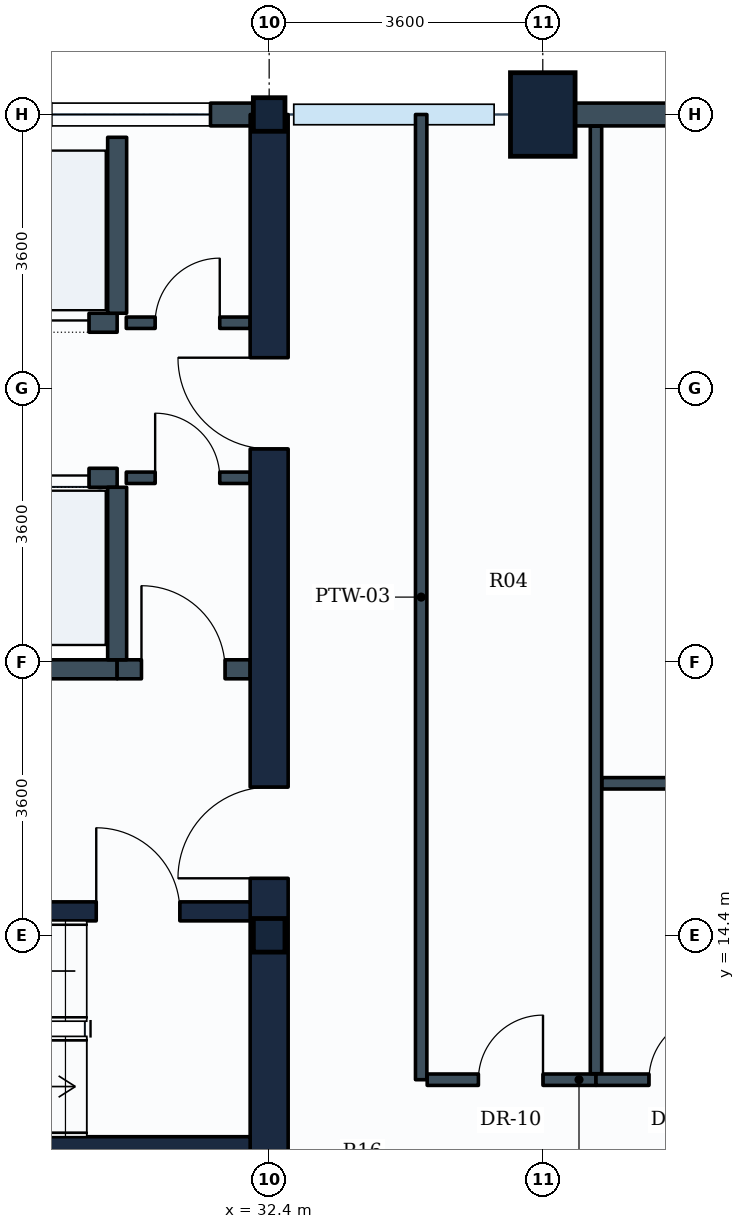
"""IFC4 building model, lengths in metres.
Left out: names, types, materials, properties, quantities, classifications, styles, units other than length and angle.
Written with IfcOpenShell. Run it as: python <this file> out.ifc"""

import sys

from ifc_helpers import new_model, si_unit, direction, frame, frame_2d, origin, origin_2d, place, context, subcontext, project, spatial, rectangle, i_section, extrude, element, fill, save


model = new_model("IFC4")
c1 = context("Model", 3, precision=1e-05, world=origin(), true_north=direction((0.0, 1.0)))
c2 = subcontext(c1, "Body", "Model", "MODEL_VIEW")
j1 = project(units=[si_unit("LENGTHUNIT", "METRE"), si_unit("PLANEANGLEUNIT", "RADIAN")], contexts=[c1])
p1 = place(None, origin())
s1 = spatial("IfcSite", under=j1, at=p1, CompositionType="ELEMENT")
p2 = place(p1, origin())
s2 = spatial("IfcBuilding", under=s1, at=p2, CompositionType="ELEMENT")
p3 = place(p2, frame((0.0, 0.0, 115.2)))
s3 = spatial("IfcBuildingStorey", under=s2, at=p3, CompositionType="ELEMENT", Elevation=115.2)
for number, where, z_axis, x_axis in (
    (1, (32.4, 14.4, 0.0), (0.0, 0.0, 1.0), (1.0, 0.0, 0.0)),
    (2, (32.4, 25.2, 0.0), (0.0, 0.0, 1.0), (1.0, 0.0, 0.0)),
):
    element("IfcColumn", number, at=place(p3, frame(where, z_axis=z_axis, x_axis=x_axis)), inside=s3, PredefinedType="COLUMN", context=c2, shape_type="SweptSolid", body=[
        extrude(i_section(OverallWidth=0.416, OverallDepth=0.442, WebThickness=0.025, FlangeThickness=0.041, FilletRadius=0.015, at=origin_2d()), origin(), (0.0, 0.0, 1.0), 4.8),
    ])
p4 = place(p3, frame((36.0, 25.2, 0.0), z_axis=(0.0, 0.0, 1.0), x_axis=(1.0, 0.0, 0.0)))
e3 = element("IfcColumn", 3, at=p4, inside=s3, PredefinedType="COLUMN", context=c2, shape_type="SweptSolid", body=[
    extrude(rectangle(XDim=0.85, YDim=1.1, at=origin_2d()), origin(), (0.0, 0.0, 1.0), 4.8),
])
p5 = place(p3, frame((36.0, 25.2, 0.0), z_axis=(0.0, 0.0, 1.0), x_axis=(1.0, 0.0, 0.0)))
e4 = element("IfcWall", 4, at=p5, inside=s3, PredefinedType="STANDARD", context=c2, shape_type="SweptSolid", body=[
    extrude(rectangle(XDim=3.6, YDim=0.3, at=frame_2d((1.8, 0.0))), origin(), (0.0, 0.0, 1.0), 3.93),
])
p6 = place(p3, frame((28.8, 25.2, 0.0), z_axis=(0.0, 0.0, 1.0), x_axis=(1.0, 0.0, 0.0)))
e5 = element("IfcWall", 5, at=p6, inside=s3, PredefinedType="STANDARD", context=c2, shape_type="SweptSolid", body=[
    extrude(rectangle(XDim=3.6, YDim=0.3, at=frame_2d((1.8, 0.0))), origin(), (0.0, 0.0, 1.0), 4.535),
])
p7 = place(p6, frame((0.728, 0.0, 0.85)))
e6 = element("IfcOpeningElement", 6, at=p7, cuts=e5, PredefinedType="OPENING", context=c2, shape_type="SweptSolid", body=[
    extrude(rectangle(XDim=2.1, YDim=1.35, at=frame_2d((1.05, 0.675))), frame((0.0, 0.16, 0.0), z_axis=(0.0, -1.0, 0.0), x_axis=(1.0, 0.0, 0.0)), (0.0, 0.0, 1.0), 0.32),
])
p8 = place(p3, frame((32.4, 10.8, 0.0), z_axis=(0.0, 0.0, 1.0), x_axis=(0.0, 1.0, 0.0)))
e7 = element("IfcWall", 7, at=p8, inside=s3, PredefinedType="SHEAR", context=c2, shape_type="SweptSolid", body=[
    extrude(rectangle(XDim=14.4, YDim=0.5, at=frame_2d((7.2, 0.0))), origin(), (0.0, 0.0, 1.0), 4.55),
])
p9 = place(p8, frame((4.35, 0.0, 0.0)))
e8 = element("IfcOpeningElement", 8, at=p9, cuts=e7, PredefinedType="OPENING", context=c2, shape_type="SweptSolid", body=[
    extrude(rectangle(XDim=1.2, YDim=2.1, at=frame_2d((0.6, 1.05))), frame((0.0, 0.26, 0.0), z_axis=(0.0, -1.0, 0.0), x_axis=(1.0, 0.0, 0.0)), (0.0, 0.0, 1.0), 0.52),
])
p10 = place(p8, frame((10.0, 0.0, 0.0)))
e9 = element("IfcOpeningElement", 9, at=p10, cuts=e7, PredefinedType="OPENING", context=c2, shape_type="SweptSolid", body=[
    extrude(rectangle(XDim=1.2, YDim=2.1, at=frame_2d((0.6, 1.05))), frame((0.0, 0.26, 0.0), z_axis=(0.0, -1.0, 0.0), x_axis=(1.0, 0.0, 0.0)), (0.0, 0.0, 1.0), 0.52),
])
p11 = place(p3, frame((23.35, 11.625, 0.0), z_axis=(0.0, 0.0, 1.0), x_axis=(1.0, 0.0, 0.0)))
e10 = element("IfcWall", 10, at=p11, inside=s3, PredefinedType="SHEAR", context=c2, shape_type="SweptSolid", body=[
    extrude(rectangle(XDim=8.8, YDim=0.25, at=frame_2d((4.4, 0.0))), origin(), (0.0, 0.0, 1.0), 4.55),
])
p12 = place(p3, frame((23.35, 14.715, 0.0), z_axis=(0.0, 0.0, 1.0), x_axis=(1.0, 0.0, 0.0)))
e11 = element("IfcWall", 11, at=p12, inside=s3, PredefinedType="SHEAR", context=c2, shape_type="SweptSolid", body=[
    extrude(rectangle(XDim=8.8, YDim=0.25, at=frame_2d((4.4, 0.0))), origin(), (0.0, 0.0, 1.0), 4.55),
])
p13 = place(p12, frame((6.775, 0.0, 0.0)))
e12 = element("IfcOpeningElement", 12, at=p13, cuts=e11, PredefinedType="OPENING", context=c2, shape_type="SweptSolid", body=[
    extrude(rectangle(XDim=1.1, YDim=2.1, at=frame_2d((0.55, 1.05))), frame((0.0, 0.135, 0.0), z_axis=(0.0, -1.0, 0.0), x_axis=(1.0, 0.0, 0.0)), (0.0, 0.0, 1.0), 0.27),
])
p14 = place(p3, frame((21.88, 17.9, 0.0), z_axis=(0.0, 0.0, 1.0), x_axis=(1.0, 0.0, 0.0)))
e13 = element("IfcWall", 13, at=p14, inside=s3, PredefinedType="PARTITIONING", context=c2, shape_type="SweptSolid", body=[
    extrude(rectangle(XDim=8.52, YDim=0.25, at=frame_2d((4.26, 0.0))), origin(), (0.0, 0.0, 1.0), 4.535),
])
p15 = place(p3, frame((30.4, 17.9, 0.0), z_axis=(0.0, 0.0, 1.0), x_axis=(1.0, 0.0, 0.0)))
e14 = element("IfcWall", 14, at=p15, inside=s3, PredefinedType="PARTITIONING", context=c2, shape_type="SweptSolid", body=[
    extrude(rectangle(XDim=1.75, YDim=0.25, at=frame_2d((0.875, 0.0))), origin(), (0.0, 0.0, 1.0), 4.535),
])
p16 = place(p15, frame((0.32, 0.0, 0.0)))
e15 = element("IfcOpeningElement", 15, at=p16, cuts=e14, PredefinedType="OPENING", context=c2, shape_type="SweptSolid", body=[
    extrude(rectangle(XDim=1.1, YDim=2.1, at=frame_2d((0.55, 1.05))), frame((0.0, 0.135, 0.0), z_axis=(0.0, -1.0, 0.0), x_axis=(1.0, 0.0, 0.0)), (0.0, 0.0, 1.0), 0.27),
])
p17 = place(p3, frame((23.18, 20.42, 0.0), z_axis=(0.0, 0.0, 1.0), x_axis=(1.0, 0.0, 0.0)))
e16 = element("IfcWall", 16, at=p17, inside=s3, PredefinedType="PARTITIONING", context=c2, shape_type="SweptSolid", body=[
    extrude(rectangle(XDim=7.22, YDim=0.25, at=frame_2d((3.61, 0.0))), origin(), (0.0, 0.0, 1.0), 4.535),
])
p18 = place(p17, frame((0.41, 0.0, 0.0)))
e17 = element("IfcOpeningElement", 17, at=p18, cuts=e16, PredefinedType="OPENING", context=c2, shape_type="SweptSolid", body=[
    extrude(rectangle(XDim=1.1, YDim=2.1, at=frame_2d((0.55, 1.05))), frame((0.0, 0.135, 0.0), z_axis=(0.0, -1.0, 0.0), x_axis=(1.0, 0.0, 0.0)), (0.0, 0.0, 1.0), 0.27),
])
p19 = place(p17, frame((2.19, 0.0, 0.0)))
e18 = element("IfcOpeningElement", 18, at=p19, cuts=e16, PredefinedType="OPENING", context=c2, shape_type="SweptSolid", body=[
    extrude(rectangle(XDim=1.1, YDim=2.1, at=frame_2d((0.55, 1.05))), frame((0.0, 0.135, 0.0), z_axis=(0.0, -1.0, 0.0), x_axis=(1.0, 0.0, 0.0)), (0.0, 0.0, 1.0), 0.27),
])
p20 = place(p17, frame((3.97, 0.0, 0.0)))
e19 = element("IfcOpeningElement", 19, at=p20, cuts=e16, PredefinedType="OPENING", context=c2, shape_type="SweptSolid", body=[
    extrude(rectangle(XDim=1.1, YDim=2.1, at=frame_2d((0.55, 1.05))), frame((0.0, 0.135, 0.0), z_axis=(0.0, -1.0, 0.0), x_axis=(1.0, 0.0, 0.0)), (0.0, 0.0, 1.0), 0.27),
])
p21 = place(p17, frame((5.75, 0.0, 0.0)))
e20 = element("IfcOpeningElement", 20, at=p21, cuts=e16, PredefinedType="OPENING", context=c2, shape_type="SweptSolid", body=[
    extrude(rectangle(XDim=1.1, YDim=2.1, at=frame_2d((0.55, 1.05))), frame((0.0, 0.135, 0.0), z_axis=(0.0, -1.0, 0.0), x_axis=(1.0, 0.0, 0.0)), (0.0, 0.0, 1.0), 0.27),
])
p22 = place(p3, frame((30.4, 18.025, 0.0), z_axis=(0.0, 0.0, 1.0), x_axis=(0.0, 1.0, 0.0)))
e21 = element("IfcWall", 21, at=p22, inside=s3, PredefinedType="PARTITIONING", context=c2, shape_type="SweptSolid", body=[
    extrude(rectangle(XDim=2.27, YDim=0.25, at=frame_2d((1.135, 0.0))), origin(), (0.0, 0.0, 1.0), 4.535),
])
p23 = place(p3, frame((23.18, 22.46, 0.0), z_axis=(0.0, 0.0, 1.0), x_axis=(1.0, 0.0, 0.0)))
e22 = element("IfcWall", 22, at=p23, inside=s3, PredefinedType="PARTITIONING", context=c2, shape_type="SweptSolid", body=[
    extrude(rectangle(XDim=7.22, YDim=0.25, at=frame_2d((3.61, 0.0))), origin(), (0.0, 0.0, 1.0), 4.535),
])
p24 = place(p23, frame((0.41, 0.0, 0.0)))
e23 = element("IfcOpeningElement", 23, at=p24, cuts=e22, PredefinedType="OPENING", context=c2, shape_type="SweptSolid", body=[
    extrude(rectangle(XDim=1.1, YDim=2.1, at=frame_2d((0.55, 1.05))), frame((0.0, 0.135, 0.0), z_axis=(0.0, -1.0, 0.0), x_axis=(1.0, 0.0, 0.0)), (0.0, 0.0, 1.0), 0.27),
])
p25 = place(p23, frame((2.19, 0.0, 0.0)))
e24 = element("IfcOpeningElement", 24, at=p25, cuts=e22, PredefinedType="OPENING", context=c2, shape_type="SweptSolid", body=[
    extrude(rectangle(XDim=1.1, YDim=2.1, at=frame_2d((0.55, 1.05))), frame((0.0, 0.135, 0.0), z_axis=(0.0, -1.0, 0.0), x_axis=(1.0, 0.0, 0.0)), (0.0, 0.0, 1.0), 0.27),
])
p26 = place(p23, frame((3.97, 0.0, 0.0)))
e25 = element("IfcOpeningElement", 25, at=p26, cuts=e22, PredefinedType="OPENING", context=c2, shape_type="SweptSolid", body=[
    extrude(rectangle(XDim=1.1, YDim=2.1, at=frame_2d((0.55, 1.05))), frame((0.0, 0.135, 0.0), z_axis=(0.0, -1.0, 0.0), x_axis=(1.0, 0.0, 0.0)), (0.0, 0.0, 1.0), 0.27),
])
p27 = place(p23, frame((5.75, 0.0, 0.0)))
e26 = element("IfcOpeningElement", 26, at=p27, cuts=e22, PredefinedType="OPENING", context=c2, shape_type="SweptSolid", body=[
    extrude(rectangle(XDim=1.1, YDim=2.1, at=frame_2d((0.55, 1.05))), frame((0.0, 0.135, 0.0), z_axis=(0.0, -1.0, 0.0), x_axis=(1.0, 0.0, 0.0)), (0.0, 0.0, 1.0), 0.27),
])
p28 = place(p3, frame((30.4, 22.585, 0.0), z_axis=(0.0, 0.0, 1.0), x_axis=(0.0, 1.0, 0.0)))
e27 = element("IfcWall", 27, at=p28, inside=s3, PredefinedType="PARTITIONING", context=c2, shape_type="SweptSolid", body=[
    extrude(rectangle(XDim=2.315, YDim=0.25, at=frame_2d((1.157, 0.0))), origin(), (0.0, 0.0, 1.0), 4.535),
])
p29 = place(p3, frame((30.52, 22.46, 0.0), z_axis=(0.0, 0.0, 1.0), x_axis=(1.0, 0.0, 0.0)))
e28 = element("IfcWall", 28, at=p29, inside=s3, PredefinedType="PARTITIONING", context=c2, shape_type="SweptSolid", body=[
    extrude(rectangle(XDim=1.63, YDim=0.15, at=frame_2d((0.815, 0.0))), origin(), (0.0, 0.0, 1.0), 4.535),
])
p30 = place(p29, frame((0.38, 0.0, 0.0)))
e29 = element("IfcOpeningElement", 29, at=p30, cuts=e28, PredefinedType="OPENING", context=c2, shape_type="SweptSolid", body=[
    extrude(rectangle(XDim=0.85, YDim=2.1, at=frame_2d((0.425, 1.05))), frame((0.0, 0.085, 0.0), z_axis=(0.0, -1.0, 0.0), x_axis=(1.0, 0.0, 0.0)), (0.0, 0.0, 1.0), 0.17),
])
p31 = place(p3, frame((30.52, 20.42, 0.0), z_axis=(0.0, 0.0, 1.0), x_axis=(1.0, 0.0, 0.0)))
e30 = element("IfcWall", 30, at=p31, inside=s3, PredefinedType="PARTITIONING", context=c2, shape_type="SweptSolid", body=[
    extrude(rectangle(XDim=1.63, YDim=0.15, at=frame_2d((0.815, 0.0))), origin(), (0.0, 0.0, 1.0), 4.535),
])
p32 = place(p31, frame((0.38, 0.0, 0.0)))
e31 = element("IfcOpeningElement", 31, at=p32, cuts=e30, PredefinedType="OPENING", context=c2, shape_type="SweptSolid", body=[
    extrude(rectangle(XDim=0.85, YDim=2.1, at=frame_2d((0.425, 1.05))), frame((0.0, 0.085, 0.0), z_axis=(0.0, -1.0, 0.0), x_axis=(1.0, 0.0, 0.0)), (0.0, 0.0, 1.0), 0.17),
])
p33 = place(p3, frame((34.4, 12.5, 0.0), z_axis=(0.0, 0.0, 1.0), x_axis=(0.0, 1.0, 0.0)))
e32 = element("IfcWall", 32, at=p33, inside=s3, PredefinedType="PARTITIONING", context=c2, shape_type="SweptSolid", body=[
    extrude(rectangle(XDim=12.7, YDim=0.15, at=frame_2d((6.35, 0.0))), origin(), (0.0, 0.0, 1.0), 3.93),
])
p34 = place(p3, frame((34.479, 12.5, 0.0), z_axis=(0.0, 0.0, 1.0), x_axis=(1.0, 0.0, 0.0)))
e33 = element("IfcWall", 33, at=p34, inside=s3, PredefinedType="PARTITIONING", context=c2, shape_type="SweptSolid", body=[
    extrude(rectangle(XDim=2.221, YDim=0.15, at=frame_2d((1.11, 0.0))), origin(), (0.0, 0.0, 1.0), 4.08),
])
p35 = place(p34, frame((0.674, 0.0, 0.0)))
e34 = element("IfcOpeningElement", 34, at=p35, cuts=e33, PredefinedType="OPENING", context=c2, shape_type="SweptSolid", body=[
    extrude(rectangle(XDim=0.85, YDim=2.1, at=frame_2d((0.425, 1.05))), frame((0.0, 0.085, 0.0), z_axis=(0.0, -1.0, 0.0), x_axis=(1.0, 0.0, 0.0)), (0.0, 0.0, 1.0), 0.17),
])
p36 = place(p3, frame((36.7, 12.579, 0.0), z_axis=(0.0, 0.0, 1.0), x_axis=(0.0, 1.0, 0.0)))
e35 = element("IfcWall", 35, at=p36, inside=s3, PredefinedType="PARTITIONING", context=c2, shape_type="SweptSolid", body=[
    extrude(rectangle(XDim=12.467, YDim=0.15, at=frame_2d((6.233, 0.0))), origin(), (0.0, 0.0, 1.0), 3.93),
])
p37 = place(p3, frame((36.7, 12.5, 0.0), z_axis=(0.0, 0.0, 1.0), x_axis=(1.0, 0.0, 0.0)))
e36 = element("IfcWall", 36, at=p37, inside=s3, PredefinedType="PARTITIONING", context=c2, shape_type="SweptSolid", body=[
    extrude(rectangle(XDim=2.3, YDim=0.15, at=frame_2d((1.15, 0.0))), origin(), (0.0, 0.0, 1.0), 4.535),
])
p38 = place(p37, frame((0.697, 0.0, 0.0)))
e37 = element("IfcOpeningElement", 37, at=p38, cuts=e36, PredefinedType="OPENING", context=c2, shape_type="SweptSolid", body=[
    extrude(rectangle(XDim=0.85, YDim=2.1, at=frame_2d((0.425, 1.05))), frame((0.0, 0.085, 0.0), z_axis=(0.0, -1.0, 0.0), x_axis=(1.0, 0.0, 0.0)), (0.0, 0.0, 1.0), 0.17),
])
p39 = place(p3, frame((36.779, 16.4, 0.0), z_axis=(0.0, 0.0, 1.0), x_axis=(1.0, 0.0, 0.0)))
e38 = element("IfcWall", 38, at=p39, inside=s3, PredefinedType="PARTITIONING", context=c2, shape_type="SweptSolid", body=[
    extrude(rectangle(XDim=2.142, YDim=0.15, at=frame_2d((1.071, 0.0))), origin(), (0.0, 0.0, 1.0), 4.535),
])
p40 = place(p7, origin())
e39 = element("IfcWindow", 39, at=p40, inside=s3, PartitioningType="SINGLE_PANEL", PredefinedType="WINDOW", context=c2, shape_type="SweptSolid", body=[
    extrude(rectangle(XDim=2.1, YDim=1.35, at=frame_2d((1.05, 0.675))), frame((0.0, 0.03, 0.0), z_axis=(0.0, -1.0, 0.0), x_axis=(1.0, 0.0, 0.0)), (0.0, 0.0, 1.0), 0.06),
])
fill(e6, e39)
p41 = place(p13, origin())
e40 = element("IfcDoor", 40, at=p41, inside=s3, OperationType="SINGLE_SWING_LEFT", PredefinedType="DOOR", context=c2, shape_type="SweptSolid", body=[
    extrude(rectangle(XDim=1.1, YDim=2.1, at=frame_2d((0.55, 1.05))), frame((0.0, 0.025, 0.0), z_axis=(0.0, -1.0, 0.0), x_axis=(1.0, 0.0, 0.0)), (0.0, 0.0, 1.0), 0.05),
])
fill(e12, e40)
p42 = place(p9, origin())
e41 = element("IfcDoor", 41, at=p42, inside=s3, OperationType="SINGLE_SWING_LEFT", PredefinedType="DOOR", context=c2, shape_type="SweptSolid", body=[
    extrude(rectangle(XDim=1.2, YDim=2.1, at=frame_2d((0.6, 1.05))), frame((0.0, 0.025, 0.0), z_axis=(0.0, -1.0, 0.0), x_axis=(1.0, 0.0, 0.0)), (0.0, 0.0, 1.0), 0.05),
])
fill(e8, e41)
p43 = place(p16, origin())
e42 = element("IfcDoor", 42, at=p43, inside=s3, OperationType="SINGLE_SWING_LEFT", PredefinedType="DOOR", context=c2, shape_type="SweptSolid", body=[
    extrude(rectangle(XDim=1.1, YDim=2.1, at=frame_2d((0.55, 1.05))), frame((0.0, 0.025, 0.0), z_axis=(0.0, -1.0, 0.0), x_axis=(1.0, 0.0, 0.0)), (0.0, 0.0, 1.0), 0.05),
])
fill(e15, e42)
p44 = place(p21, origin())
e43 = element("IfcDoor", 43, at=p44, inside=s3, OperationType="SLIDING_TO_LEFT", PredefinedType="DOOR", context=c2, shape_type="SweptSolid", body=[
    extrude(rectangle(XDim=1.1, YDim=2.1, at=frame_2d((0.55, 1.05))), frame((0.0, 0.025, 0.0), z_axis=(0.0, -1.0, 0.0), x_axis=(1.0, 0.0, 0.0)), (0.0, 0.0, 1.0), 0.05),
])
fill(e20, e43)
p45 = place(p27, origin())
e44 = element("IfcDoor", 44, at=p45, inside=s3, OperationType="SLIDING_TO_LEFT", PredefinedType="DOOR", context=c2, shape_type="SweptSolid", body=[
    extrude(rectangle(XDim=1.1, YDim=2.1, at=frame_2d((0.55, 1.05))), frame((0.0, 0.025, 0.0), z_axis=(0.0, -1.0, 0.0), x_axis=(1.0, 0.0, 0.0)), (0.0, 0.0, 1.0), 0.05),
])
fill(e26, e44)
p46 = place(p10, origin())
e45 = element("IfcDoor", 45, at=p46, inside=s3, OperationType="SINGLE_SWING_RIGHT", PredefinedType="DOOR", context=c2, shape_type="SweptSolid", body=[
    extrude(rectangle(XDim=1.2, YDim=2.1, at=frame_2d((0.6, 1.05))), frame((0.0, 0.025, 0.0), z_axis=(0.0, -1.0, 0.0), x_axis=(1.0, 0.0, 0.0)), (0.0, 0.0, 1.0), 0.05),
])
fill(e9, e45)
p47 = place(p30, origin())
e46 = element("IfcDoor", 46, at=p47, inside=s3, OperationType="SINGLE_SWING_RIGHT", PredefinedType="DOOR", context=c2, shape_type="SweptSolid", body=[
    extrude(rectangle(XDim=0.85, YDim=2.1, at=frame_2d((0.425, 1.05))), frame((0.0, 0.025, 0.0), z_axis=(0.0, -1.0, 0.0), x_axis=(1.0, 0.0, 0.0)), (0.0, 0.0, 1.0), 0.05),
])
fill(e29, e46)
p48 = place(p32, origin())
e47 = element("IfcDoor", 47, at=p48, inside=s3, OperationType="SINGLE_SWING_LEFT", PredefinedType="DOOR", context=c2, shape_type="SweptSolid", body=[
    extrude(rectangle(XDim=0.85, YDim=2.1, at=frame_2d((0.425, 1.05))), frame((0.0, 0.025, 0.0), z_axis=(0.0, -1.0, 0.0), x_axis=(1.0, 0.0, 0.0)), (0.0, 0.0, 1.0), 0.05),
])
fill(e31, e47)
p49 = place(p35, origin())
e48 = element("IfcDoor", 48, at=p49, inside=s3, OperationType="SINGLE_SWING_RIGHT", PredefinedType="DOOR", context=c2, shape_type="SweptSolid", body=[
    extrude(rectangle(XDim=0.85, YDim=2.1, at=frame_2d((0.425, 1.05))), frame((0.0, 0.025, 0.0), z_axis=(0.0, -1.0, 0.0), x_axis=(1.0, 0.0, 0.0)), (0.0, 0.0, 1.0), 0.05),
])
fill(e34, e48)
p50 = place(p38, origin())
e49 = element("IfcDoor", 49, at=p50, inside=s3, OperationType="SINGLE_SWING_RIGHT", PredefinedType="DOOR", context=c2, shape_type="SweptSolid", body=[
    extrude(rectangle(XDim=0.85, YDim=2.1, at=frame_2d((0.425, 1.05))), frame((0.0, 0.025, 0.0), z_axis=(0.0, -1.0, 0.0), x_axis=(1.0, 0.0, 0.0)), (0.0, 0.0, 1.0), 0.05),
])
fill(e37, e49)
save(model, sys.argv[1])
